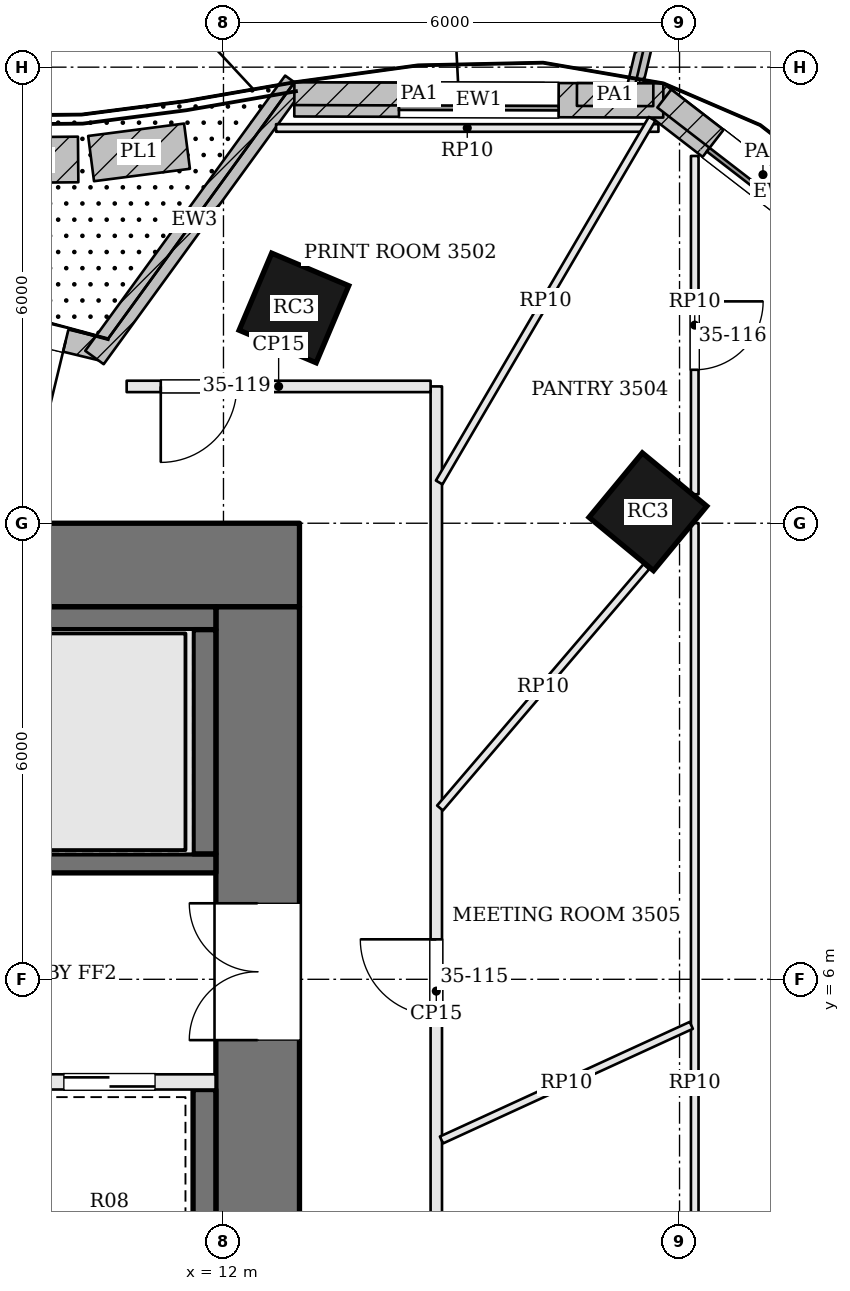
"""IFC4 building model, lengths in metres.
Left out: names, types, materials, properties, quantities, classifications, styles, units other than length and angle.
Written with IfcOpenShell. Run it as: python <this file> out.ifc"""

import sys

from ifc_helpers import new_model, si_unit, direction, frame, frame_2d, origin, origin_2d, place, context, subcontext, project, spatial, rectangle, extrude, element, fill, save


model = new_model("IFC4")
c1 = context("Model", 3, precision=1e-05, world=origin(), true_north=direction((0.0, 1.0)))
c2 = subcontext(c1, "Body", "Model", "MODEL_VIEW")
j1 = project(units=[si_unit("LENGTHUNIT", "METRE"), si_unit("PLANEANGLEUNIT", "RADIAN")], contexts=[c1])
p1 = place(None, origin())
s1 = spatial("IfcSite", under=j1, at=p1, CompositionType="ELEMENT")
p2 = place(p1, origin())
s2 = spatial("IfcBuilding", under=s1, at=p2, CompositionType="ELEMENT")
p3 = place(p2, frame((0.0, 0.0, 146.1)))
s3 = spatial("IfcBuildingStorey", under=s2, at=p3, CompositionType="ELEMENT", Elevation=146.1)
p4 = place(p3, frame((-13.0, 11.45, 0.0), z_axis=(0.0, 0.0, 1.0), x_axis=(1.0, 0.0, 0.0)))
e1 = element("IfcWall", 1, at=p4, inside=s3, PredefinedType="SHEAR", context=c2, shape_type="SweptSolid", body=[
    extrude(rectangle(XDim=26.0, YDim=1.1, at=frame_2d((13.0, 0.0))), origin(), (0.0, 0.0, 1.0), 3.9),
])
p5 = place(p4, frame((8.975, 0.0, 0.0)))
e2 = element("IfcOpeningElement", 2, at=p5, cuts=e1, PredefinedType="OPENING", context=c2, shape_type="SweptSolid", body=[
    extrude(rectangle(XDim=0.7, YDim=2.1, at=frame_2d((0.35, 1.05))), frame((0.0, 0.56, 0.0), z_axis=(0.0, -1.0, 0.0), x_axis=(1.0, 0.0, 0.0)), (0.0, 0.0, 1.0), 1.12),
])
p6 = place(p4, frame((11.025, 0.0, 0.0)))
e3 = element("IfcOpeningElement", 3, at=p6, cuts=e1, PredefinedType="OPENING", context=c2, shape_type="SweptSolid", body=[
    extrude(rectangle(XDim=0.7, YDim=2.1, at=frame_2d((0.35, 1.05))), frame((0.0, 0.56, 0.0), z_axis=(0.0, -1.0, 0.0), x_axis=(1.0, 0.0, 0.0)), (0.0, 0.0, 1.0), 1.12),
])
p7 = place(p4, frame((12.925, 0.0, 0.0)))
e4 = element("IfcOpeningElement", 4, at=p7, cuts=e1, PredefinedType="OPENING", context=c2, shape_type="SweptSolid", body=[
    extrude(rectangle(XDim=1.0, YDim=2.1, at=frame_2d((0.5, 1.05))), frame((0.0, 0.56, 0.0), z_axis=(0.0, -1.0, 0.0), x_axis=(1.0, 0.0, 0.0)), (0.0, 0.0, 1.0), 1.12),
])
p8 = place(p4, frame((15.775, 0.0, 0.0)))
e5 = element("IfcOpeningElement", 5, at=p8, cuts=e1, PredefinedType="OPENING", context=c2, shape_type="SweptSolid", body=[
    extrude(rectangle(XDim=1.0, YDim=2.1, at=frame_2d((0.5, 1.05))), frame((0.0, 0.56, 0.0), z_axis=(0.0, -1.0, 0.0), x_axis=(1.0, 0.0, 0.0)), (0.0, 0.0, 1.0), 1.12),
])
p9 = place(p3, frame((12.45, -1.9, 0.0), z_axis=(0.0, 0.0, 1.0), x_axis=(0.0, 1.0, 0.0)))
e6 = element("IfcWall", 6, at=p9, inside=s3, PredefinedType="SHEAR", context=c2, shape_type="SweptSolid", body=[
    extrude(rectangle(XDim=12.8, YDim=1.1, at=frame_2d((6.4, 0.0))), origin(), (0.0, 0.0, 1.0), 3.9),
])
p10 = place(p9, frame((7.1, 0.0, 0.0)))
e7 = element("IfcOpeningElement", 7, at=p10, cuts=e6, PredefinedType="OPENING", context=c2, shape_type="SweptSolid", body=[
    extrude(rectangle(XDim=1.8, YDim=2.1, at=frame_2d((0.9, 1.05))), frame((0.0, 0.56, 0.0), z_axis=(0.0, -1.0, 0.0), x_axis=(1.0, 0.0, 0.0)), (0.0, 0.0, 1.0), 1.12),
])
for number, where, z_axis, x_axis in (
    (8, (17.584, 12.151, 0.0), (0.0, 0.0, 1.0), (-0.771, 0.637, 0.0)),
    (9, (12.927, 14.832, 0.0), (0.0, 0.0, 1.0), (-0.921, 0.389, 0.0)),
):
    element("IfcColumn", number, at=place(p3, frame(where, z_axis=z_axis, x_axis=x_axis)), inside=s3, PredefinedType="COLUMN", context=c2, shape_type="SweptSolid", body=[
        extrude(rectangle(XDim=1.1, YDim=1.1, at=origin_2d()), origin(), (0.0, 0.0, 1.0), 3.9),
    ])
p11 = place(p3, frame((20.896, 15.104, 0.0), z_axis=(0.0, 0.0, 1.0), x_axis=(-0.791693388686, 0.610918634771, 0.0)))
e10 = element("IfcWall", 10, at=p11, inside=s3, PredefinedType="SOLIDWALL", context=c2, shape_type="SweptSolid", body=[
    extrude(rectangle(XDim=4.1, YDim=0.45, at=frame_2d((2.05, 0.0))), origin(), (0.0, 0.0, 1.0), 3.7),
])
p12 = place(p11, frame((1.0, 0.0, 0.9)))
e11 = element("IfcOpeningElement", 11, at=p12, cuts=e10, PredefinedType="OPENING", context=c2, shape_type="SweptSolid", body=[
    extrude(rectangle(XDim=2.1, YDim=2.3, at=frame_2d((1.05, 1.15))), frame((0.0, 0.235, 0.0), z_axis=(0.0, -1.0, 0.0), x_axis=(1.0, 0.0, 0.0)), (0.0, 0.0, 1.0), 0.47),
])
p13 = place(p3, frame((17.786, 17.562, 0.0), z_axis=(0.0, 0.0, 1.0), x_axis=(-0.999995890425, 0.002866903016, 0.0)))
e12 = element("IfcWall", 12, at=p13, inside=s3, PredefinedType="SOLIDWALL", context=c2, shape_type="SweptSolid", body=[
    extrude(rectangle(XDim=4.854, YDim=0.45, at=frame_2d((2.427, 0.0))), origin(), (0.0, 0.0, 1.0), 3.7),
])
p14 = place(p13, frame((1.377, 0.0, 0.9)))
e13 = element("IfcOpeningElement", 13, at=p14, cuts=e12, PredefinedType="OPENING", context=c2, shape_type="SweptSolid", body=[
    extrude(rectangle(XDim=2.1, YDim=2.3, at=frame_2d((1.05, 1.15))), frame((0.0, 0.235, 0.0), z_axis=(0.0, -1.0, 0.0), x_axis=(1.0, 0.0, 0.0)), (0.0, 0.0, 1.0), 0.47),
])
p15 = place(p3, frame((10.444, 14.277, 0.0), z_axis=(0.0, 0.0, 1.0), x_axis=(-0.971972269839, 0.235095526678, 0.0)))
e14 = element("IfcWall", 14, at=p15, inside=s3, PredefinedType="SOLIDWALL", context=c2, shape_type="SweptSolid", body=[
    extrude(rectangle(XDim=2.867, YDim=0.3, at=frame_2d((1.434, 0.0))), origin(), (0.0, 0.0, 1.0), 3.7),
])
p16 = place(p15, frame((0.534, 0.0, 0.0)))
e15 = element("IfcOpeningElement", 15, at=p16, cuts=e14, PredefinedType="OPENING", context=c2, shape_type="SweptSolid", body=[
    extrude(rectangle(XDim=1.8, YDim=2.4, at=frame_2d((0.9, 1.2))), frame((0.0, 0.16, 0.0), z_axis=(0.0, -1.0, 0.0), x_axis=(1.0, 0.0, 0.0)), (0.0, 0.0, 1.0), 0.32),
])
p17 = place(p3, frame((17.362, 17.538, 0.0), z_axis=(0.0, 0.0, 1.0), x_axis=(0.230469860183, 0.973079464148, 0.0)))
e16 = element("IfcWall", 16, at=p17, inside=s3, PredefinedType="SOLIDWALL", context=c2, shape_type="SweptSolid", body=[
    extrude(rectangle(XDim=1.75, YDim=0.2, at=frame_2d((0.875, 0.0))), origin(), (0.0, 0.0, 1.0), 3.7),
])
p18 = place(p3, frame((12.933, 17.801, 0.0), z_axis=(0.0, 0.0, 1.0), x_axis=(-0.587762911206, -0.809033225653, 0.0)))
e17 = element("IfcWall", 17, at=p18, inside=s3, PredefinedType="SOLIDWALL", context=c2, shape_type="SweptSolid", body=[
    extrude(rectangle(XDim=4.475, YDim=0.3, at=frame_2d((2.238, 0.0))), origin(), (0.0, 0.0, 1.0), 3.254),
])
p19 = place(p3, frame((11.52, 16.96, 0.0), z_axis=(0.0, 0.0, 1.0), x_axis=(-0.991749557979, -0.128190538841, 0.0)))
e18 = element("IfcWall", 18, at=p19, inside=s3, PredefinedType="SOLIDWALL", context=c2, shape_type="SweptSolid", body=[
    extrude(rectangle(XDim=1.272, YDim=0.6, at=frame_2d((0.636, 0.0))), origin(), (0.0, 0.0, 1.0), 0.6),
])
p20 = place(p3, frame((10.088, 16.786, 0.0), z_axis=(0.0, 0.0, 1.0), x_axis=(-0.99996256786, -0.008652333714, 0.0)))
e19 = element("IfcWall", 19, at=p20, inside=s3, PredefinedType="SOLIDWALL", context=c2, shape_type="SweptSolid", body=[
    extrude(rectangle(XDim=1.185, YDim=0.6, at=frame_2d((0.593, 0.0))), origin(), (0.0, 0.0, 1.0), 0.6),
])
p21 = place(p3, frame((20.396, 15.584, 3.9), z_axis=(0.0, 0.0, 1.0), x_axis=(-0.791668035353, 0.610951488909, 0.0)))
e20 = element("IfcWall", 20, at=p21, inside=s3, PredefinedType="PARAPET", context=c2, shape_type="SweptSolid", body=[
    extrude(rectangle(XDim=3.279, YDim=0.3, at=frame_2d((1.639, 0.0))), origin(), (0.0, 0.0, 1.0), 1.1),
])
p22 = place(p3, frame((17.655, 17.637, 3.9), z_axis=(0.0, 0.0, 1.0), x_axis=(-0.999995745964, 0.002916856819, 0.0)))
e21 = element("IfcWall", 21, at=p22, inside=s3, PredefinedType="PARAPET", context=c2, shape_type="SweptSolid", body=[
    extrude(rectangle(XDim=1.004, YDim=0.3, at=frame_2d((0.502, 0.0))), origin(), (0.0, 0.0, 1.0), 1.1),
])
p23 = place(p3, frame((16.22, 17.642, 3.9), z_axis=(0.0, 0.0, 1.0), x_axis=(-0.999996017811, 0.002822120214, 0.0)))
e22 = element("IfcWall", 22, at=p23, inside=s3, PredefinedType="PARAPET", context=c2, shape_type="SweptSolid", body=[
    extrude(rectangle(XDim=3.287, YDim=0.3, at=frame_2d((1.644, 0.0))), origin(), (0.0, 0.0, 1.0), 1.1),
])
p24 = place(p3, frame((11.9, 7.525, 0.0), z_axis=(0.0, 0.0, 1.0), x_axis=(-1.0, 0.0, 0.0)))
e23 = element("IfcWall", 23, at=p24, inside=s3, PredefinedType="SOLIDWALL", context=c2, shape_type="SweptSolid", body=[
    extrude(rectangle(XDim=6.8, YDim=0.25, at=frame_2d((3.4, 0.0))), origin(), (0.0, 0.0, 1.0), 3.7),
])
p25 = place(p24, frame((5.5, 0.0, 0.0)))
e24 = element("IfcOpeningElement", 24, at=p25, cuts=e23, PredefinedType="OPENING", context=c2, shape_type="SweptSolid", body=[
    extrude(rectangle(XDim=1.2, YDim=2.1, at=frame_2d((0.6, 1.05))), frame((0.0, 0.135, 0.0), z_axis=(0.0, -1.0, 0.0), x_axis=(1.0, 0.0, 0.0)), (0.0, 0.0, 1.0), 0.27),
])
p26 = place(p3, frame((11.9, 4.65, 0.0), z_axis=(0.0, 0.0, 1.0), x_axis=(-1.0, 0.0, 0.0)))
e25 = element("IfcWall", 25, at=p26, inside=s3, PredefinedType="SOLIDWALL", context=c2, shape_type="SweptSolid", body=[
    extrude(rectangle(XDim=6.8, YDim=0.2, at=frame_2d((3.4, 0.0))), origin(), (0.0, 0.0, 1.0), 3.7),
])
p27 = place(p26, frame((4.1, 0.0, 0.0)))
e26 = element("IfcOpeningElement", 26, at=p27, cuts=e25, PredefinedType="OPENING", context=c2, shape_type="SweptSolid", body=[
    extrude(rectangle(XDim=1.2, YDim=2.1, at=frame_2d((0.6, 1.05))), frame((0.0, 0.11, 0.0), z_axis=(0.0, -1.0, 0.0), x_axis=(1.0, 0.0, 0.0)), (0.0, 0.0, 1.0), 0.22),
])
p28 = place(p26, frame((0.8, 0.0, 0.0)))
e27 = element("IfcOpeningElement", 27, at=p28, cuts=e25, PredefinedType="OPENING", context=c2, shape_type="SweptSolid", body=[
    extrude(rectangle(XDim=1.2, YDim=2.1, at=frame_2d((0.6, 1.05))), frame((0.0, 0.11, 0.0), z_axis=(0.0, -1.0, 0.0), x_axis=(1.0, 0.0, 0.0)), (0.0, 0.0, 1.0), 0.22),
])
p29 = place(p3, frame((11.9, 10.75, 0.0), z_axis=(0.0, 0.0, 1.0), x_axis=(-1.0, 0.0, 0.0)))
e28 = element("IfcWall", 28, at=p29, inside=s3, PredefinedType="SOLIDWALL", context=c2, shape_type="SweptSolid", body=[
    extrude(rectangle(XDim=6.8, YDim=0.3, at=frame_2d((3.4, 0.0))), origin(), (0.0, 0.0, 1.0), 3.7),
])
p30 = place(p3, frame((11.75, 10.6, 0.0), z_axis=(0.0, 0.0, 1.0), x_axis=(0.0, -1.0, 0.0)))
e29 = element("IfcWall", 29, at=p30, inside=s3, PredefinedType="SOLIDWALL", context=c2, shape_type="SweptSolid", body=[
    extrude(rectangle(XDim=2.95, YDim=0.3, at=frame_2d((1.475, 0.0))), origin(), (0.0, 0.0, 1.0), 3.7),
])
p31 = place(p3, frame((11.75, 4.55, 0.0), z_axis=(0.0, 0.0, 1.0), x_axis=(0.0, -1.0, 0.0)))
e30 = element("IfcWall", 30, at=p31, inside=s3, PredefinedType="SOLIDWALL", context=c2, shape_type="SweptSolid", body=[
    extrude(rectangle(XDim=3.0, YDim=0.3, at=frame_2d((1.5, 0.0))), origin(), (0.0, 0.0, 1.0), 3.7),
])
p32 = place(p3, frame((14.8, -2.111, 0.0), z_axis=(0.0, 0.0, 1.0), x_axis=(0.0, 1.0, 0.0)))
e31 = element("IfcWall", 31, at=p32, inside=s3, PredefinedType="PARTITIONING", context=c2, shape_type="SweptSolid", body=[
    extrude(rectangle(XDim=15.911, YDim=0.15, at=frame_2d((7.956, 0.0))), origin(), (0.0, 0.0, 1.0), 3.198),
])
p33 = place(p32, frame((2.045, 0.0, 0.0)))
e32 = element("IfcOpeningElement", 32, at=p33, cuts=e31, PredefinedType="OPENING", context=c2, shape_type="SweptSolid", body=[
    extrude(rectangle(XDim=1.8, YDim=2.1, at=frame_2d((0.9, 1.05))), frame((0.0, 0.085, 0.0), z_axis=(0.0, -1.0, 0.0), x_axis=(1.0, 0.0, 0.0)), (0.0, 0.0, 1.0), 0.17),
])
p34 = place(p32, frame((7.637, 0.0, 0.0)))
e33 = element("IfcOpeningElement", 33, at=p34, cuts=e31, PredefinedType="OPENING", context=c2, shape_type="SweptSolid", body=[
    extrude(rectangle(XDim=1.0, YDim=2.4, at=frame_2d((0.5, 1.2))), frame((0.0, 0.085, 0.0), z_axis=(0.0, -1.0, 0.0), x_axis=(1.0, 0.0, 0.0)), (0.0, 0.0, 1.0), 0.17),
])
p35 = place(p3, frame((14.725, 13.8, 0.0), z_axis=(0.0, 0.0, 1.0), x_axis=(-1.0, 0.0, 0.0)))
e34 = element("IfcWall", 34, at=p35, inside=s3, PredefinedType="PARTITIONING", context=c2, shape_type="SweptSolid", body=[
    extrude(rectangle(XDim=3.999, YDim=0.15, at=frame_2d((2.0, 0.0))), origin(), (0.0, 0.0, 1.0), 3.198),
])
p36 = place(p35, frame((2.55, 0.0, 0.0)))
e35 = element("IfcOpeningElement", 35, at=p36, cuts=e34, PredefinedType="OPENING", context=c2, shape_type="SweptSolid", body=[
    extrude(rectangle(XDim=1.0, YDim=2.1, at=frame_2d((0.5, 1.05))), frame((0.0, 0.085, 0.0), z_axis=(0.0, -1.0, 0.0), x_axis=(1.0, 0.0, 0.0)), (0.0, 0.0, 1.0), 0.17),
])
p37 = place(p3, frame((12.692, 17.2, 0.0), z_axis=(0.0, 0.0, 1.0), x_axis=(1.0, 0.0, 0.0)))
e36 = element("IfcWall", 36, at=p37, inside=s3, PredefinedType="PARTITIONING", context=c2, shape_type="SweptSolid", body=[
    extrude(rectangle(XDim=5.031, YDim=0.1, at=frame_2d((2.515, 0.0))), origin(), (0.0, 0.0, 1.0), 3.184),
])
p38 = place(p3, frame((18.2, 16.832, 0.0), z_axis=(0.0, 0.0, 1.0), x_axis=(0.0, -1.0, 0.0)))
e37 = element("IfcWall", 37, at=p38, inside=s3, PredefinedType="PARTITIONING", context=c2, shape_type="SweptSolid", body=[
    extrude(rectangle(XDim=4.45, YDim=0.1, at=frame_2d((2.225, 0.0))), origin(), (0.0, 0.0, 1.0), 3.184),
])
p39 = place(p38, frame((1.913, 0.0, 0.0)))
e38 = element("IfcOpeningElement", 38, at=p39, cuts=e37, PredefinedType="OPENING", context=c2, shape_type="SweptSolid", body=[
    extrude(rectangle(XDim=0.9, YDim=2.1, at=frame_2d((0.45, 1.05))), frame((0.0, 0.06, 0.0), z_axis=(0.0, -1.0, 0.0), x_axis=(1.0, 0.0, 0.0)), (0.0, 0.0, 1.0), 0.12),
])
p40 = place(p3, frame((18.2, 12.001, 0.0), z_axis=(0.0, 0.0, 1.0), x_axis=(0.0, -1.0, 0.0)))
e39 = element("IfcWall", 39, at=p40, inside=s3, PredefinedType="PARTITIONING", context=c2, shape_type="SweptSolid", body=[
    extrude(rectangle(XDim=14.732, YDim=0.1, at=frame_2d((7.366, 0.0))), origin(), (0.0, 0.0, 1.0), 3.184),
])
p41 = place(p40, frame((10.652, 0.0, 0.0)))
e40 = element("IfcOpeningElement", 40, at=p41, cuts=e39, PredefinedType="OPENING", context=c2, shape_type="SweptSolid", body=[
    extrude(rectangle(XDim=1.0, YDim=2.1, at=frame_2d((0.5, 1.05))), frame((0.0, 0.06, 0.0), z_axis=(0.0, -1.0, 0.0), x_axis=(1.0, 0.0, 0.0)), (0.0, 0.0, 1.0), 0.12),
])
p42 = place(p3, frame((14.868, 3.886, 0.0), z_axis=(0.0, 0.0, 1.0), x_axis=(0.908901714509, 0.417010399585, 0.0)))
e41 = element("IfcWall", 41, at=p42, inside=s3, PredefinedType="PARTITIONING", context=c2, shape_type="SweptSolid", body=[
    extrude(rectangle(XDim=3.616, YDim=0.1, at=frame_2d((1.808, 0.0))), origin(), (0.0, 0.0, 1.0), 3.184),
])
p43 = place(p3, frame((14.849, 8.253, 0.0), z_axis=(0.0, 0.0, 1.0), x_axis=(0.649813826089, 0.76009340967, 0.0)))
e42 = element("IfcWall", 42, at=p43, inside=s3, PredefinedType="PARTITIONING", context=c2, shape_type="SweptSolid", body=[
    extrude(rectangle(XDim=4.177, YDim=0.1, at=frame_2d((2.089, 0.0))), origin(), (0.0, 0.0, 1.0), 3.184),
])
p44 = place(p3, frame((14.838, 12.536, 0.0), z_axis=(0.0, 0.0, 1.0), x_axis=(0.505302396087, 0.862942343676, 0.0)))
e43 = element("IfcWall", 43, at=p44, inside=s3, PredefinedType="PARTITIONING", context=c2, shape_type="SweptSolid", body=[
    extrude(rectangle(XDim=5.544, YDim=0.1, at=frame_2d((2.772, 0.0))), origin(), (0.0, 0.0, 1.0), 3.184),
])
p45 = place(p12, origin())
e44 = element("IfcWindow", 44, at=p45, inside=s3, PartitioningType="SINGLE_PANEL", PredefinedType="WINDOW", context=c2, shape_type="SweptSolid", body=[
    extrude(rectangle(XDim=2.1, YDim=2.3, at=frame_2d((1.05, 1.15))), frame((0.0, 0.135, 0.0), z_axis=(0.0, -1.0, 0.0), x_axis=(1.0, 0.0, 0.0)), (0.0, 0.0, 1.0), 0.06),
])
fill(e11, e44)
p46 = place(p14, origin())
e45 = element("IfcWindow", 45, at=p46, inside=s3, PartitioningType="SINGLE_PANEL", PredefinedType="WINDOW", context=c2, shape_type="SweptSolid", body=[
    extrude(rectangle(XDim=2.1, YDim=2.3, at=frame_2d((1.05, 1.15))), frame((0.0, 0.135, 0.0), z_axis=(0.0, -1.0, 0.0), x_axis=(1.0, 0.0, 0.0)), (0.0, 0.0, 1.0), 0.06),
])
fill(e13, e45)
p47 = place(p16, origin())
e46 = element("IfcDoor", 46, at=p47, inside=s3, OperationType="DOUBLE_DOOR_DOUBLE_SWING", PredefinedType="DOOR", context=c2, shape_type="SweptSolid", body=[
    extrude(rectangle(XDim=1.8, YDim=2.4, at=frame_2d((0.9, 1.2))), frame((0.0, 0.025, 0.0), z_axis=(0.0, -1.0, 0.0), x_axis=(1.0, 0.0, 0.0)), (0.0, 0.0, 1.0), 0.05),
])
fill(e15, e46)
p48 = place(p10, origin())
e47 = element("IfcDoor", 47, at=p48, inside=s3, OperationType="DOUBLE_DOOR_SINGLE_SWING", PredefinedType="DOOR", context=c2, shape_type="SweptSolid", body=[
    extrude(rectangle(XDim=1.8, YDim=2.1, at=frame_2d((0.9, 1.05))), frame((0.0, 0.025, 0.0), z_axis=(0.0, -1.0, 0.0), x_axis=(1.0, 0.0, 0.0)), (0.0, 0.0, 1.0), 0.05),
])
fill(e7, e47)
p49 = place(p28, origin())
e48 = element("IfcDoor", 48, at=p49, inside=s3, OperationType="SLIDING_TO_RIGHT", PredefinedType="DOOR", context=c2, shape_type="SweptSolid", body=[
    extrude(rectangle(XDim=1.2, YDim=2.1, at=frame_2d((0.6, 1.05))), frame((0.0, 0.025, 0.0), z_axis=(0.0, -1.0, 0.0), x_axis=(1.0, 0.0, 0.0)), (0.0, 0.0, 1.0), 0.05),
])
fill(e27, e48)
p50 = place(p34, origin())
e49 = element("IfcDoor", 49, at=p50, inside=s3, OperationType="SINGLE_SWING_RIGHT", PredefinedType="DOOR", context=c2, shape_type="SweptSolid", body=[
    extrude(rectangle(XDim=1.0, YDim=2.4, at=frame_2d((0.5, 1.2))), frame((0.0, 0.025, 0.0), z_axis=(0.0, -1.0, 0.0), x_axis=(1.0, 0.0, 0.0)), (0.0, 0.0, 1.0), 0.05),
])
fill(e33, e49)
p51 = place(p39, origin())
e50 = element("IfcDoor", 50, at=p51, inside=s3, OperationType="SINGLE_SWING_LEFT", PredefinedType="DOOR", context=c2, shape_type="SweptSolid", body=[
    extrude(rectangle(XDim=0.9, YDim=2.1, at=frame_2d((0.45, 1.05))), frame((0.0, 0.025, 0.0), z_axis=(0.0, -1.0, 0.0), x_axis=(1.0, 0.0, 0.0)), (0.0, 0.0, 1.0), 0.05),
])
fill(e38, e50)
p52 = place(p36, origin())
e51 = element("IfcDoor", 51, at=p52, inside=s3, OperationType="SINGLE_SWING_RIGHT", PredefinedType="DOOR", context=c2, shape_type="SweptSolid", body=[
    extrude(rectangle(XDim=1.0, YDim=2.1, at=frame_2d((0.5, 1.05))), frame((0.0, 0.025, 0.0), z_axis=(0.0, -1.0, 0.0), x_axis=(1.0, 0.0, 0.0)), (0.0, 0.0, 1.0), 0.05),
])
fill(e35, e51)
save(model, sys.argv[1])
